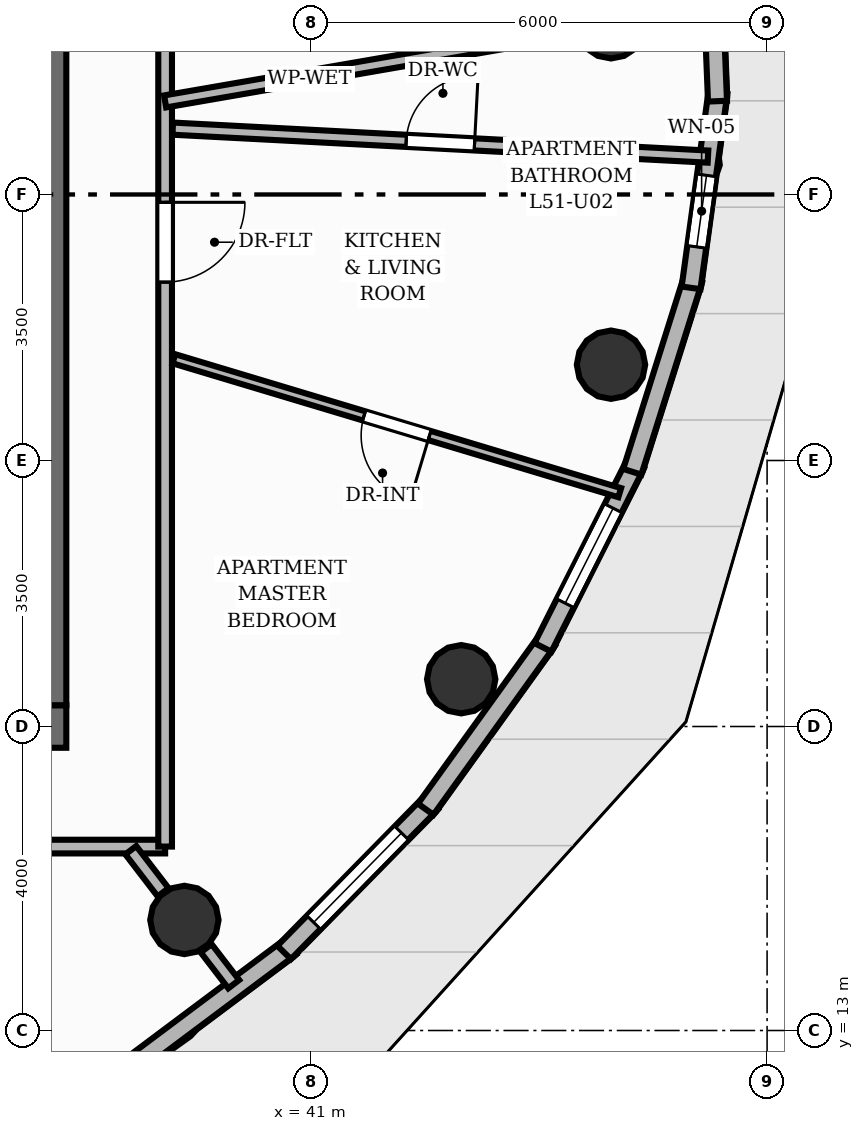
"""IFC4 building model, lengths in metres.
Left out: names, types, materials, properties, quantities, classifications, styles, units other than length and angle.
Written with IfcOpenShell. Run it as: python <this file> out.ifc"""

import sys

from ifc_helpers import new_model, si_unit, direction, frame, frame_2d, origin, origin_2d, place, context, subcontext, project, spatial, rectangle, circle, extrude, element, fill, save


model = new_model("IFC4")
c1 = context("Model", 3, precision=1e-05, world=origin(), true_north=direction((0.0, 1.0)))
c2 = subcontext(c1, "Body", "Model", "MODEL_VIEW")
j1 = project(units=[si_unit("LENGTHUNIT", "METRE"), si_unit("PLANEANGLEUNIT", "RADIAN")], contexts=[c1])
p1 = place(None, origin())
s1 = spatial("IfcSite", under=j1, at=p1, CompositionType="ELEMENT")
p2 = place(p1, origin())
s2 = spatial("IfcBuilding", under=s1, at=p2, CompositionType="ELEMENT")
p3 = place(p2, frame((0.0, 0.0, 172.64)))
s3 = spatial("IfcBuildingStorey", under=s2, at=p3, CompositionType="ELEMENT", Elevation=172.64)
p4 = place(p3, frame((26.22, 17.0, 0.0), z_axis=(0.0, 0.0, 1.0), x_axis=(1.0, 0.0, 0.0)))
e1 = element("IfcWall", 1, at=p4, inside=s3, PredefinedType="SHEAR", context=c2, shape_type="SweptSolid", body=[
    extrude(rectangle(XDim=11.56, YDim=0.56, at=frame_2d((5.78, 0.0))), origin(), (0.0, 0.0, 1.0), 3.2),
])
p5 = place(p4, frame((2.28, 0.0, 0.0)))
e2 = element("IfcOpeningElement", 2, at=p5, cuts=e1, PredefinedType="OPENING", context=c2, shape_type="SweptSolid", body=[
    extrude(rectangle(XDim=1.1, YDim=2.15, at=frame_2d((0.55, 1.075))), frame((0.0, 0.29, 0.0), z_axis=(0.0, -1.0, 0.0), x_axis=(1.0, 0.0, 0.0)), (0.0, 0.0, 1.0), 0.58),
])
p6 = place(p4, frame((5.83, 0.0, 0.0)))
e3 = element("IfcOpeningElement", 3, at=p6, cuts=e1, PredefinedType="OPENING", context=c2, shape_type="SweptSolid", body=[
    extrude(rectangle(XDim=0.9, YDim=2.1, at=frame_2d((0.45, 1.05))), frame((0.0, 0.29, 0.0), z_axis=(0.0, -1.0, 0.0), x_axis=(1.0, 0.0, 0.0)), (0.0, 0.0, 1.0), 0.58),
])
p7 = place(p3, frame((37.5, 17.28, 0.0), z_axis=(0.0, 0.0, 1.0), x_axis=(0.0, 1.0, 0.0)))
e4 = element("IfcWall", 4, at=p7, inside=s3, PredefinedType="SHEAR", context=c2, shape_type="SweptSolid", body=[
    extrude(rectangle(XDim=13.44, YDim=0.56, at=frame_2d((6.72, 0.0))), origin(), (0.0, 0.0, 1.0), 3.2),
])
for number, where, z_axis, x_axis in (
    (5, (44.946, 26.24, 0.0), (0.0, 0.0, 1.0), (1.0, 0.0, 0.0)),
    (6, (39.333, 14.455, 0.0), (0.0, 0.0, 1.0), (1.0, 0.0, 0.0)),
    (7, (42.975, 17.622, 0.0), (0.0, 0.0, 1.0), (1.0, 0.0, 0.0)),
    (8, (44.946, 21.76, 0.0), (0.0, 0.0, 1.0), (1.0, 0.0, 0.0)),
):
    element("IfcColumn", number, at=place(p3, frame(where, z_axis=z_axis, x_axis=x_axis)), inside=s3, PredefinedType="COLUMN", context=c2, shape_type="SweptSolid", body=[
        extrude(circle(Radius=0.45, at=origin_2d()), origin(), (0.0, 0.0, 1.0), 3.2),
    ])
p8 = place(p3, frame((40.728, 14.099, 0.0), z_axis=(0.0, 0.0, 1.0), x_axis=(-0.800636941996, -0.599149803564, 0.0)))
e9 = element("IfcWall", 9, at=p8, inside=s3, PredefinedType="SOLIDWALL", context=c2, shape_type="SweptSolid", body=[
    extrude(rectangle(XDim=2.758, YDim=0.25, at=frame_2d((1.379, 0.0))), origin(), (0.0, 0.0, 1.0), 2.96),
])
p9 = place(p3, frame((42.579, 15.995, 0.0), z_axis=(0.0, 0.0, 1.0), x_axis=(-0.700794099323, -0.713363603189, 0.0)))
e10 = element("IfcWall", 10, at=p9, inside=s3, PredefinedType="SOLIDWALL", context=c2, shape_type="SweptSolid", body=[
    extrude(rectangle(XDim=2.758, YDim=0.25, at=frame_2d((1.379, 0.0))), origin(), (0.0, 0.0, 1.0), 2.96),
])
p10 = place(p9, frame((0.554, 0.0, 0.85)))
e11 = element("IfcOpeningElement", 11, at=p10, cuts=e10, PredefinedType="OPENING", context=c2, shape_type="SweptSolid", body=[
    extrude(rectangle(XDim=1.65, YDim=1.55, at=frame_2d((0.825, 0.775))), frame((0.0, 0.135, 0.0), z_axis=(0.0, -1.0, 0.0), x_axis=(1.0, 0.0, 0.0)), (0.0, 0.0, 1.0), 0.27),
])
p11 = place(p3, frame((44.108, 18.135, 0.0), z_axis=(0.0, 0.0, 1.0), x_axis=(-0.583975860001, -0.811771023711, 0.0)))
e12 = element("IfcWall", 12, at=p11, inside=s3, PredefinedType="SOLIDWALL", context=c2, shape_type="SweptSolid", body=[
    extrude(rectangle(XDim=2.738, YDim=0.25, at=frame_2d((1.369, 0.0))), origin(), (0.0, 0.0, 1.0), 2.96),
])
p12 = place(p3, frame((45.268, 20.453, 0.0), z_axis=(0.0, 0.0, 1.0), x_axis=(-0.450391703917, -0.892831066352, 0.0)))
e13 = element("IfcWall", 13, at=p12, inside=s3, PredefinedType="SOLIDWALL", context=c2, shape_type="SweptSolid", body=[
    extrude(rectangle(XDim=2.702, YDim=0.25, at=frame_2d((1.351, 0.0))), origin(), (0.0, 0.0, 1.0), 2.96),
])
p13 = place(p12, frame((0.651, 0.0, 0.85)))
e14 = element("IfcOpeningElement", 14, at=p13, cuts=e13, PredefinedType="OPENING", context=c2, shape_type="SweptSolid", body=[
    extrude(rectangle(XDim=1.4, YDim=1.55, at=frame_2d((0.7, 0.775))), frame((0.0, 0.135, 0.0), z_axis=(0.0, -1.0, 0.0), x_axis=(1.0, 0.0, 0.0)), (0.0, 0.0, 1.0), 0.27),
])
p14 = place(p3, frame((46.024, 22.88, 0.0), z_axis=(0.0, 0.0, 1.0), x_axis=(-0.300796358401, -0.953688392911, 0.0)))
e15 = element("IfcWall", 15, at=p14, inside=s3, PredefinedType="SOLIDWALL", context=c2, shape_type="SweptSolid", body=[
    extrude(rectangle(XDim=2.651, YDim=0.25, at=frame_2d((1.325, 0.0))), origin(), (0.0, 0.0, 1.0), 2.96),
])
p15 = place(p3, frame((46.353, 25.34, 0.0), z_axis=(0.0, 0.0, 1.0), x_axis=(-0.136289981327, -0.990668986589, 0.0)))
e16 = element("IfcWall", 16, at=p15, inside=s3, PredefinedType="SOLIDWALL", context=c2, shape_type="SweptSolid", body=[
    extrude(rectangle(XDim=2.592, YDim=0.25, at=frame_2d((1.296, 0.0))), origin(), (0.0, 0.0, 1.0), 2.96),
])
p16 = place(p15, frame((1.098, 0.0, 0.85)))
e17 = element("IfcOpeningElement", 17, at=p16, cuts=e16, PredefinedType="OPENING", context=c2, shape_type="SweptSolid", body=[
    extrude(rectangle(XDim=0.95, YDim=1.45, at=frame_2d((0.475, 0.725))), frame((0.0, 0.135, 0.0), z_axis=(0.0, -1.0, 0.0), x_axis=(1.0, 0.0, 0.0)), (0.0, 0.0, 1.0), 0.27),
])
p17 = place(p3, frame((46.245, 27.758, 0.0), z_axis=(0.0, 0.0, 1.0), x_axis=(0.040399298921, -0.999183615081, 0.0)))
e18 = element("IfcWall", 18, at=p17, inside=s3, PredefinedType="SOLIDWALL", context=c2, shape_type="SweptSolid", body=[
    extrude(rectangle(XDim=2.532, YDim=0.25, at=frame_2d((1.266, 0.0))), origin(), (0.0, 0.0, 1.0), 2.96),
])
p18 = place(p3, frame((39.62, 14.082, 0.0), z_axis=(0.0, 0.0, 1.0), x_axis=(0.609274747308, -0.792959193334, 0.0)))
e19 = element("IfcWall", 19, at=p18, inside=s3, PredefinedType="PARTITIONING", context=c2, shape_type="SweptSolid", body=[
    extrude(rectangle(XDim=0.595, YDim=0.18, at=frame_2d((0.298, 0.0))), origin(), (0.0, 0.0, 1.0), 2.404),
])
p19 = place(p3, frame((39.08, 15.42, 0.0), z_axis=(0.0, 0.0, 1.0), x_axis=(-1.0, 0.0, 0.0)))
e20 = element("IfcWall", 20, at=p19, inside=s3, PredefinedType="PARTITIONING", context=c2, shape_type="SweptSolid", body=[
    extrude(rectangle(XDim=14.16, YDim=0.18, at=frame_2d((7.08, 0.0))), origin(), (0.0, 0.0, 1.0), 2.955),
])
p20 = place(p19, frame((2.007, 0.0, 0.0)))
e21 = element("IfcOpeningElement", 21, at=p20, cuts=e20, PredefinedType="OPENING", context=c2, shape_type="SweptSolid", body=[
    extrude(rectangle(XDim=0.9, YDim=2.1, at=frame_2d((0.45, 1.05))), frame((0.0, 0.1, 0.0), z_axis=(0.0, -1.0, 0.0), x_axis=(1.0, 0.0, 0.0)), (0.0, 0.0, 1.0), 0.2),
])
p21 = place(p19, frame((6.287, 0.0, 0.0)))
e22 = element("IfcOpeningElement", 22, at=p21, cuts=e20, PredefinedType="OPENING", context=c2, shape_type="SweptSolid", body=[
    extrude(rectangle(XDim=0.9, YDim=2.1, at=frame_2d((0.45, 1.05))), frame((0.0, 0.1, 0.0), z_axis=(0.0, -1.0, 0.0), x_axis=(1.0, 0.0, 0.0)), (0.0, 0.0, 1.0), 0.2),
])
p22 = place(p3, frame((39.08, 30.248, 0.0), z_axis=(0.0, 0.0, 1.0), x_axis=(0.0, -1.0, 0.0)))
e23 = element("IfcWall", 23, at=p22, inside=s3, PredefinedType="PARTITIONING", context=c2, shape_type="SweptSolid", body=[
    extrude(rectangle(XDim=14.828, YDim=0.18, at=frame_2d((7.414, 0.0))), origin(), (0.0, 0.0, 1.0), 2.955),
])
p23 = place(p22, frame((6.351, 0.0, 0.0)))
e24 = element("IfcOpeningElement", 24, at=p23, cuts=e23, PredefinedType="OPENING", context=c2, shape_type="SweptSolid", body=[
    extrude(rectangle(XDim=1.05, YDim=2.15, at=frame_2d((0.525, 1.075))), frame((0.0, 0.1, 0.0), z_axis=(0.0, -1.0, 0.0), x_axis=(1.0, 0.0, 0.0)), (0.0, 0.0, 1.0), 0.2),
])
p24 = place(p3, frame((38.628, 15.372, 0.0), z_axis=(0.0, 0.0, 1.0), x_axis=(0.609304996033, -0.792935950635, 0.0)))
e25 = element("IfcWall", 25, at=p24, inside=s3, PredefinedType="PARTITIONING", context=c2, shape_type="SweptSolid", body=[
    extrude(rectangle(XDim=0.698, YDim=0.18, at=frame_2d((0.349, 0.0))), origin(), (0.0, 0.0, 1.0), 2.404),
])
p25 = place(p3, frame((39.18, 24.867, 0.0), z_axis=(0.0, 0.0, 1.0), x_axis=(0.998636225788, -0.052208127179, 0.0)))
e26 = element("IfcWall", 26, at=p25, inside=s3, PredefinedType="PLUMBINGWALL", context=c2, shape_type="SweptSolid", body=[
    extrude(rectangle(XDim=7.052, YDim=0.16, at=frame_2d((3.526, 0.0))), origin(), (0.0, 0.0, 1.0), 2.692),
])
p26 = place(p25, frame((3.076, 0.0, 0.0)))
e27 = element("IfcOpeningElement", 27, at=p26, cuts=e26, PredefinedType="OPENING", context=c2, shape_type="SweptSolid", body=[
    extrude(rectangle(XDim=0.9, YDim=2.1, at=frame_2d((0.45, 1.05))), frame((0.0, 0.09, 0.0), z_axis=(0.0, -1.0, 0.0), x_axis=(1.0, 0.0, 0.0)), (0.0, 0.0, 1.0), 0.18),
])
p27 = place(p3, frame((45.061, 20.077, 0.0), z_axis=(0.0, 0.0, 1.0), x_axis=(-0.957731888454, 0.287662353878, 0.0)))
e28 = element("IfcWall", 28, at=p27, inside=s3, PredefinedType="PARTITIONING", context=c2, shape_type="SweptSolid", body=[
    extrude(rectangle(XDim=6.125, YDim=0.125, at=frame_2d((3.062, 0.0))), origin(), (0.0, 0.0, 1.0), 2.692),
])
p28 = place(p27, frame((2.613, 0.0, 0.0)))
e29 = element("IfcOpeningElement", 29, at=p28, cuts=e28, PredefinedType="OPENING", context=c2, shape_type="SweptSolid", body=[
    extrude(rectangle(XDim=0.9, YDim=2.1, at=frame_2d((0.45, 1.05))), frame((0.0, 0.073, 0.0), z_axis=(0.0, -1.0, 0.0), x_axis=(1.0, 0.0, 0.0)), (0.0, 0.0, 1.0), 0.145),
])
p29 = place(p3, frame((39.08, 25.225, 0.0), z_axis=(0.0, 0.0, 1.0), x_axis=(0.985359973695, 0.170486721591, 0.0)))
e30 = element("IfcWall", 30, at=p29, inside=s3, PredefinedType="PLUMBINGWALL", context=c2, shape_type="SweptSolid", body=[
    extrude(rectangle(XDim=5.499, YDim=0.16, at=frame_2d((2.75, 0.0))), origin(), (0.0, 0.0, 1.0), 2.404),
])
p30 = place(p10, origin())
e31 = element("IfcWindow", 31, at=p30, inside=s3, PartitioningType="SINGLE_PANEL", PredefinedType="WINDOW", context=c2, shape_type="SweptSolid", body=[
    extrude(rectangle(XDim=1.65, YDim=1.55, at=frame_2d((0.825, 0.775))), frame((0.0, 0.03, 0.0), z_axis=(0.0, -1.0, 0.0), x_axis=(1.0, 0.0, 0.0)), (0.0, 0.0, 1.0), 0.06),
])
fill(e11, e31)
p31 = place(p13, origin())
e32 = element("IfcWindow", 32, at=p31, inside=s3, PartitioningType="SINGLE_PANEL", PredefinedType="WINDOW", context=c2, shape_type="SweptSolid", body=[
    extrude(rectangle(XDim=1.4, YDim=1.55, at=frame_2d((0.7, 0.775))), frame((0.0, 0.03, 0.0), z_axis=(0.0, -1.0, 0.0), x_axis=(1.0, 0.0, 0.0)), (0.0, 0.0, 1.0), 0.06),
])
fill(e14, e32)
p32 = place(p16, origin())
e33 = element("IfcWindow", 33, at=p32, inside=s3, PartitioningType="SINGLE_PANEL", PredefinedType="WINDOW", context=c2, shape_type="SweptSolid", body=[
    extrude(rectangle(XDim=0.95, YDim=1.45, at=frame_2d((0.475, 0.725))), frame((0.0, 0.03, 0.0), z_axis=(0.0, -1.0, 0.0), x_axis=(1.0, 0.0, 0.0)), (0.0, 0.0, 1.0), 0.06),
])
fill(e17, e33)
p33 = place(p23, origin())
e34 = element("IfcDoor", 34, at=p33, inside=s3, OperationType="SINGLE_SWING_LEFT", PredefinedType="DOOR", context=c2, shape_type="SweptSolid", body=[
    extrude(rectangle(XDim=1.05, YDim=2.15, at=frame_2d((0.525, 1.075))), frame((0.0, 0.025, 0.0), z_axis=(0.0, -1.0, 0.0), x_axis=(1.0, 0.0, 0.0)), (0.0, 0.0, 1.0), 0.05),
])
fill(e24, e34)
p34 = place(p26, origin())
e35 = element("IfcDoor", 35, at=p34, inside=s3, OperationType="SINGLE_SWING_RIGHT", PredefinedType="DOOR", context=c2, shape_type="SweptSolid", body=[
    extrude(rectangle(XDim=0.9, YDim=2.1, at=frame_2d((0.45, 1.05))), frame((0.0, 0.025, 0.0), z_axis=(0.0, -1.0, 0.0), x_axis=(1.0, 0.0, 0.0)), (0.0, 0.0, 1.0), 0.05),
])
fill(e27, e35)
p35 = place(p28, origin())
e36 = element("IfcDoor", 36, at=p35, inside=s3, OperationType="SINGLE_SWING_LEFT", PredefinedType="DOOR", context=c2, shape_type="SweptSolid", body=[
    extrude(rectangle(XDim=0.9, YDim=2.1, at=frame_2d((0.45, 1.05))), frame((0.0, 0.025, 0.0), z_axis=(0.0, -1.0, 0.0), x_axis=(1.0, 0.0, 0.0)), (0.0, 0.0, 1.0), 0.05),
])
fill(e29, e36)
save(model, sys.argv[1])
